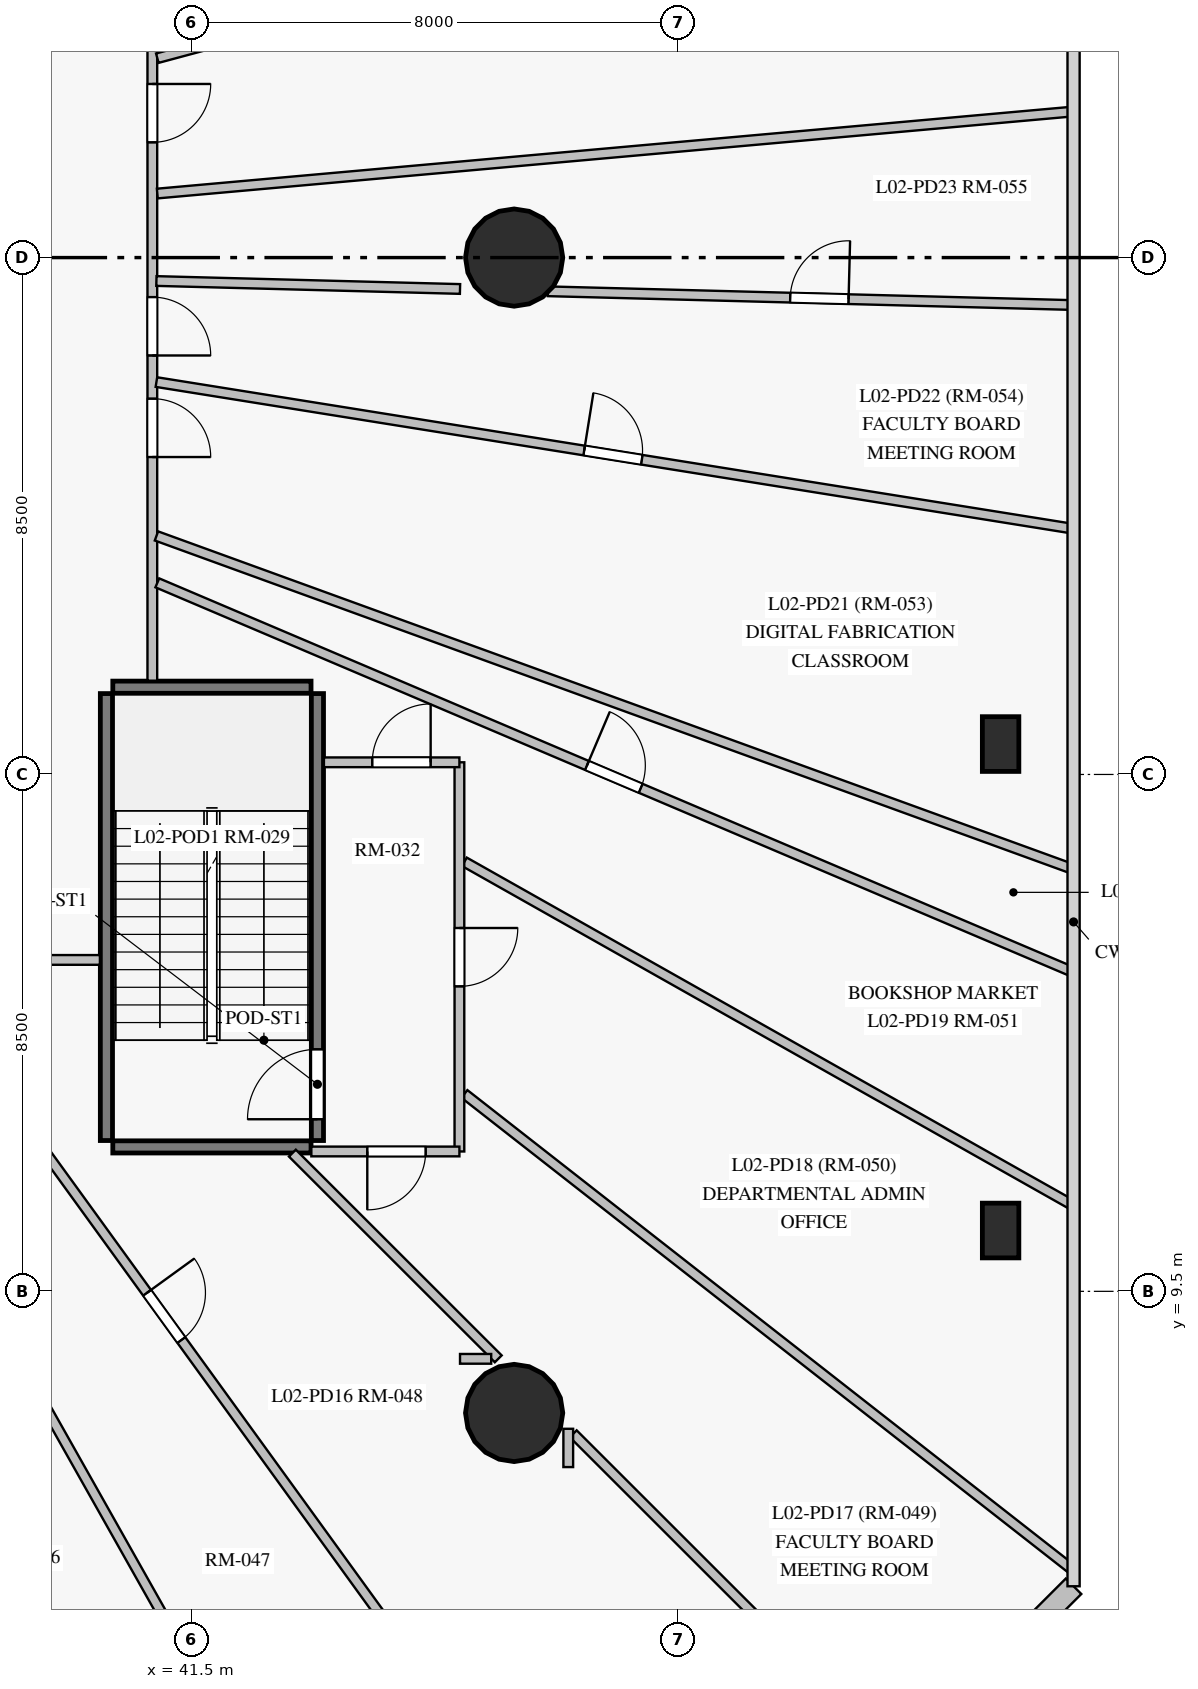
"""IFC4 building model, lengths in metres.
Left out: names, types, materials, properties, quantities, classifications, styles, units other than length and angle.
Written with IfcOpenShell. Run it as: python <this file> out.ifc"""

import sys

from ifc_helpers import new_model, si_unit, direction, frame, frame_2d, origin, origin_with_axes, origin_2d, place, context, subcontext, project, spatial, rectangle, circle, extrude, source, transform, mapped, element, fill, save


model = new_model("IFC4")
c1 = context("Model", 3, precision=1e-05, world=origin(), true_north=direction((0.0, 1.0)))
c2 = subcontext(c1, "Body", "Model", "MODEL_VIEW")
j1 = project(units=[si_unit("LENGTHUNIT", "METRE"), si_unit("PLANEANGLEUNIT", "RADIAN")], contexts=[c1])
p1 = place(None, origin())
s1 = spatial("IfcSite", under=j1, at=p1, CompositionType="ELEMENT")
p2 = place(p1, origin())
s2 = spatial("IfcBuilding", under=s1, at=p2, CompositionType="ELEMENT")
p3 = place(p2, frame((0.0, 0.0, 9.0)))
s3 = spatial("IfcBuildingStorey", under=s2, at=p3, CompositionType="ELEMENT", Elevation=9.0)
m1 = source(origin_with_axes(), c2, "Body", "SweptSolid", [
    extrude(circle(Radius=0.8, at=origin_2d()), origin(), (0.0, 0.0, 1.0), 4.5),
])
for number, where, z_axis, x_axis in (
    (1, (46.8, 7.5, 0.0), (0.0, 0.0, 1.0), (1.0, 0.0, 0.0)),
    (2, (46.8, 26.5, 0.0), (0.0, 0.0, 1.0), (1.0, 0.0, 0.0)),
):
    element("IfcColumn", number, at=place(p3, frame(where, z_axis=z_axis, x_axis=x_axis)), inside=s3, PredefinedType="COLUMN", context=c2, shape_type="MappedRepresentation", body=[
        mapped(m1, transform((0.0, 0.0, 0.0), scale=1.0)),
    ])
m2 = source(origin_with_axes(), c2, "Body", "SweptSolid", [
    extrude(rectangle(XDim=0.6, YDim=0.9, at=origin_2d()), origin(), (0.0, 0.0, 1.0), 4.5),
])
for number, where, z_axis, x_axis in (
    (3, (54.8, 10.5, 0.0), (0.0, 0.0, 1.0), (1.0, 0.0, 0.0)),
    (4, (54.8, 18.5, 0.0), (0.0, 0.0, 1.0), (1.0, 0.0, 0.0)),
):
    element("IfcColumn", number, at=place(p3, frame(where, z_axis=z_axis, x_axis=x_axis)), inside=s3, PredefinedType="PILASTER", context=c2, shape_type="MappedRepresentation", body=[
        mapped(m2, transform((0.0, 0.0, 0.0), scale=1.0)),
    ])
p4 = place(p3, frame((54.6, 3.25, 0.0), z_axis=(0.0, 0.0, 1.0), x_axis=(0.707106781187, 0.707106781187, 0.0)))
e5 = element("IfcWall", 5, at=p4, inside=s3, PredefinedType="SOLIDWALL", context=c2, shape_type="SweptSolid", body=[
    extrude(rectangle(XDim=1.98, YDim=0.36, at=frame_2d((0.99, 0.0))), origin(), (0.0, 0.0, 1.0), 4.2),
])
p5 = place(p3, frame((40.095, 11.98, 0.0), z_axis=(0.0, 0.0, 1.0), x_axis=(0.0, 1.0, 0.0)))
e6 = element("IfcWall", 6, at=p5, inside=s3, PredefinedType="SHEAR", context=c2, shape_type="SweptSolid", body=[
    extrude(rectangle(XDim=7.35, YDim=0.2, at=frame_2d((3.675, 0.0))), origin(), (0.0, 0.0, 1.0), 4.2),
])
p6 = place(p3, frame((43.565, 11.98, 0.0), z_axis=(0.0, 0.0, 1.0), x_axis=(0.0, 1.0, 0.0)))
e7 = element("IfcWall", 7, at=p6, inside=s3, PredefinedType="SHEAR", context=c2, shape_type="SweptSolid", body=[
    extrude(rectangle(XDim=7.35, YDim=0.2, at=frame_2d((3.675, 0.0))), origin(), (0.0, 0.0, 1.0), 4.2),
])
p7 = place(p6, frame((0.35, 0.0, 0.0)))
e8 = element("IfcOpeningElement", 8, at=p7, cuts=e7, PredefinedType="OPENING", context=c2, shape_type="SweptSolid", body=[
    extrude(rectangle(XDim=1.15, YDim=2.15, at=frame_2d((0.575, 1.075))), frame((0.0, 0.11, 0.0), z_axis=(0.0, -1.0, 0.0), x_axis=(1.0, 0.0, 0.0)), (0.0, 0.0, 1.0), 0.22),
])
for number, where, z_axis, x_axis in (
    (9, (40.2, 11.875, 0.0), (0.0, 0.0, 1.0), (1.0, 0.0, 0.0)),
    (10, (40.2, 19.435, 0.0), (0.0, 0.0, 1.0), (1.0, 0.0, 0.0)),
):
    element("IfcWall", number, at=place(p3, frame(where, z_axis=z_axis, x_axis=x_axis)), inside=s3, PredefinedType="SHEAR", context=c2, shape_type="SweptSolid", body=[
        extrude(rectangle(XDim=3.26, YDim=0.2, at=frame_2d((1.63, 0.0))), origin(), (0.0, 0.0, 1.0), 4.2),
    ])
p8 = place(p3, frame((40.85, 38.05, 0.0), z_axis=(0.0, 0.0, 1.0), x_axis=(0.0, -1.0, 0.0)))
e11 = element("IfcWall", 11, at=p8, inside=s3, PredefinedType="PARTITIONING", context=c2, shape_type="SweptSolid", body=[
    extrude(rectangle(XDim=18.508, YDim=0.16, at=frame_2d((9.254, 0.0))), origin(), (0.0, 0.0, 1.0), 3.25),
])
p9 = place(p8, frame((13.87, 0.0, 0.0)))
e12 = element("IfcOpeningElement", 12, at=p9, cuts=e11, PredefinedType="OPENING", context=c2, shape_type="SweptSolid", body=[
    extrude(rectangle(XDim=0.96, YDim=2.15, at=frame_2d((0.48, 1.075))), frame((0.0, 0.09, 0.0), z_axis=(0.0, -1.0, 0.0), x_axis=(1.0, 0.0, 0.0)), (0.0, 0.0, 1.0), 0.18),
])
p10 = place(p8, frame((8.695, 0.0, 0.0)))
e13 = element("IfcOpeningElement", 13, at=p10, cuts=e11, PredefinedType="OPENING", context=c2, shape_type="SweptSolid", body=[
    extrude(rectangle(XDim=0.96, YDim=2.15, at=frame_2d((0.48, 1.075))), frame((0.0, 0.09, 0.0), z_axis=(0.0, -1.0, 0.0), x_axis=(1.0, 0.0, 0.0)), (0.0, 0.0, 1.0), 0.18),
])
p11 = place(p8, frame((6.334, 0.0, 0.0)))
e14 = element("IfcOpeningElement", 14, at=p11, cuts=e11, PredefinedType="OPENING", context=c2, shape_type="SweptSolid", body=[
    extrude(rectangle(XDim=0.96, YDim=2.15, at=frame_2d((0.48, 1.075))), frame((0.0, 0.09, 0.0), z_axis=(0.0, -1.0, 0.0), x_axis=(1.0, 0.0, 0.0)), (0.0, 0.0, 1.0), 0.18),
])
p12 = place(p8, frame((12.2, 0.0, 0.0)))
e15 = element("IfcOpeningElement", 15, at=p12, cuts=e11, PredefinedType="OPENING", context=c2, shape_type="SweptSolid", body=[
    extrude(rectangle(XDim=0.96, YDim=2.15, at=frame_2d((0.48, 1.075))), frame((0.0, 0.09, 0.0), z_axis=(0.0, -1.0, 0.0), x_axis=(1.0, 0.0, 0.0)), (0.0, 0.0, 1.0), 0.18),
])
p13 = place(p8, frame((2.76, 0.0, 0.0)))
e16 = element("IfcOpeningElement", 16, at=p13, cuts=e11, PredefinedType="OPENING", context=c2, shape_type="SweptSolid", body=[
    extrude(rectangle(XDim=0.86, YDim=2.04, at=frame_2d((0.43, 1.02))), frame((0.0, 0.09, 0.0), z_axis=(0.0, -1.0, 0.0), x_axis=(1.0, 0.0, 0.0)), (0.0, 0.0, 1.0), 0.18),
])
p14 = place(p8, frame((1.494, 0.0, 0.0)))
e17 = element("IfcOpeningElement", 17, at=p14, cuts=e11, PredefinedType="OPENING", context=c2, shape_type="SweptSolid", body=[
    extrude(rectangle(XDim=0.86, YDim=2.04, at=frame_2d((0.43, 1.02))), frame((0.0, 0.09, 0.0), z_axis=(0.0, -1.0, 0.0), x_axis=(1.0, 0.0, 0.0)), (0.0, 0.0, 1.0), 0.18),
])
p15 = place(p3, frame((40.932, 21.151, 0.0), z_axis=(0.0, 0.0, 1.0), x_axis=(0.920324867376, -0.39115487788, 0.0)))
e18 = element("IfcWall", 18, at=p15, inside=s3, PredefinedType="PARTITIONING", context=c2, shape_type="SweptSolid", body=[
    extrude(rectangle(XDim=16.34, YDim=0.16, at=frame_2d((8.17, 0.0))), origin(), (0.0, 0.0, 1.0), 4.2),
])
p16 = place(p15, frame((7.677, 0.0, 0.0)))
e19 = element("IfcOpeningElement", 19, at=p16, cuts=e18, PredefinedType="OPENING", context=c2, shape_type="SweptSolid", body=[
    extrude(rectangle(XDim=0.96, YDim=2.15, at=frame_2d((0.48, 1.075))), frame((0.0, 0.09, 0.0), z_axis=(0.0, -1.0, 0.0), x_axis=(1.0, 0.0, 0.0)), (0.0, 0.0, 1.0), 0.18),
])
p17 = place(p3, frame((40.918, 21.922, 0.0), z_axis=(0.0, 0.0, 1.0), x_axis=(0.93983791992, -0.341620673088, 0.0)))
e20 = element("IfcWall", 20, at=p17, inside=s3, PredefinedType="PARTITIONING", context=c2, shape_type="SweptSolid", body=[
    extrude(rectangle(XDim=16.017, YDim=0.16, at=frame_2d((8.008, 0.0))), origin(), (0.0, 0.0, 1.0), 4.2),
])
p18 = place(p3, frame((40.932, 29.779, 0.0), z_axis=(0.0, 0.0, 1.0), x_axis=(0.96572887565, 0.259552959405, 0.0)))
e21 = element("IfcWall", 21, at=p18, inside=s3, PredefinedType="PARTITIONING", context=c2, shape_type="SweptSolid", body=[
    extrude(rectangle(XDim=15.575, YDim=0.16, at=frame_2d((7.787, 0.0))), origin(), (0.0, 0.0, 1.0), 3.7),
])
p19 = place(p3, frame((40.917, 24.453, 0.0), z_axis=(0.0, 0.0, 1.0), x_axis=(0.987442330367, -0.157979885424, 0.0)))
e22 = element("IfcWall", 22, at=p19, inside=s3, PredefinedType="PARTITIONING", context=c2, shape_type="SweptSolid", body=[
    extrude(rectangle(XDim=15.248, YDim=0.16, at=frame_2d((7.624, 0.0))), origin(), (0.0, 0.0, 1.0), 3.7),
])
p20 = place(p19, frame((7.124, 0.0, 0.0)))
e23 = element("IfcOpeningElement", 23, at=p20, cuts=e22, PredefinedType="OPENING", context=c2, shape_type="SweptSolid", body=[
    extrude(rectangle(XDim=0.96, YDim=2.15, at=frame_2d((0.48, 1.075))), frame((0.0, 0.09, 0.0), z_axis=(0.0, -1.0, 0.0), x_axis=(1.0, 0.0, 0.0)), (0.0, 0.0, 1.0), 0.18),
])
p21 = place(p3, frame((40.932, 27.553, 0.0), z_axis=(0.0, 0.0, 1.0), x_axis=(0.996013941628, 0.08919769102, 0.0)))
e24 = element("IfcWall", 24, at=p21, inside=s3, PredefinedType="PARTITIONING", context=c2, shape_type="SweptSolid", body=[
    extrude(rectangle(XDim=15.103, YDim=0.16, at=frame_2d((7.552, 0.0))), origin(), (0.0, 0.0, 1.0), 3.7),
])
p22 = place(p3, frame((39.988, 14.95, 0.0), z_axis=(0.0, 0.0, 1.0), x_axis=(-1.0, 0.0, 0.0)))
e25 = element("IfcWall", 25, at=p22, inside=s3, PredefinedType="PARTITIONING", context=c2, shape_type="SweptSolid", body=[
    extrude(rectangle(XDim=14.588, YDim=0.16, at=frame_2d((7.294, 0.0))), origin(), (0.0, 0.0, 1.0), 4.2),
])
p23 = place(p22, frame((10.34, 0.0, 0.0)))
e26 = element("IfcOpeningElement", 26, at=p23, cuts=e25, PredefinedType="OPENING", context=c2, shape_type="SweptSolid", body=[
    extrude(rectangle(XDim=0.96, YDim=2.15, at=frame_2d((0.48, 1.075))), frame((0.0, 0.09, 0.0), z_axis=(0.0, -1.0, 0.0), x_axis=(1.0, 0.0, 0.0)), (0.0, 0.0, 1.0), 0.18),
])
p24 = place(p22, frame((7.608, 0.0, 0.0)))
e27 = element("IfcOpeningElement", 27, at=p24, cuts=e25, PredefinedType="OPENING", context=c2, shape_type="SweptSolid", body=[
    extrude(rectangle(XDim=0.96, YDim=2.15, at=frame_2d((0.48, 1.075))), frame((0.0, 0.09, 0.0), z_axis=(0.0, -1.0, 0.0), x_axis=(1.0, 0.0, 0.0)), (0.0, 0.0, 1.0), 0.18),
])
p25 = place(p22, frame((5.545, 0.0, 0.0)))
e28 = element("IfcOpeningElement", 28, at=p25, cuts=e25, PredefinedType="OPENING", context=c2, shape_type="SweptSolid", body=[
    extrude(rectangle(XDim=0.96, YDim=2.15, at=frame_2d((0.48, 1.075))), frame((0.0, 0.09, 0.0), z_axis=(0.0, -1.0, 0.0), x_axis=(1.0, 0.0, 0.0)), (0.0, 0.0, 1.0), 0.18),
])
p26 = place(p22, frame((3.582, 0.0, 0.0)))
e29 = element("IfcOpeningElement", 29, at=p26, cuts=e25, PredefinedType="OPENING", context=c2, shape_type="SweptSolid", body=[
    extrude(rectangle(XDim=0.96, YDim=2.15, at=frame_2d((0.48, 1.075))), frame((0.0, 0.09, 0.0), z_axis=(0.0, -1.0, 0.0), x_axis=(1.0, 0.0, 0.0)), (0.0, 0.0, 1.0), 0.18),
])
p27 = place(p22, frame((1.54, 0.0, 0.0)))
e30 = element("IfcOpeningElement", 30, at=p27, cuts=e25, PredefinedType="OPENING", context=c2, shape_type="SweptSolid", body=[
    extrude(rectangle(XDim=0.96, YDim=2.15, at=frame_2d((0.48, 1.075))), frame((0.0, 0.09, 0.0), z_axis=(0.0, -1.0, 0.0), x_axis=(1.0, 0.0, 0.0)), (0.0, 0.0, 1.0), 0.18),
])
p28 = place(p3, frame((36.856, 14.868, 0.0), z_axis=(0.0, 0.0, 1.0), x_axis=(0.586848404005, -0.809696826422, 0.0)))
e31 = element("IfcWall", 31, at=p28, inside=s3, PredefinedType="PARTITIONING", context=c2, shape_type="SweptSolid", body=[
    extrude(rectangle(XDim=14.302, YDim=0.16, at=frame_2d((7.151, 0.0))), origin(), (0.0, 0.0, 1.0), 4.2),
])
p29 = place(p28, frame((6.659, 0.0, 0.0)))
e32 = element("IfcOpeningElement", 32, at=p29, cuts=e31, PredefinedType="OPENING", context=c2, shape_type="SweptSolid", body=[
    extrude(rectangle(XDim=0.96, YDim=2.15, at=frame_2d((0.48, 1.075))), frame((0.0, 0.09, 0.0), z_axis=(0.0, -1.0, 0.0), x_axis=(1.0, 0.0, 0.0)), (0.0, 0.0, 1.0), 0.18),
])
p30 = place(p3, frame((34.991, 14.868, 0.0), z_axis=(0.0, 0.0, 1.0), x_axis=(0.491242274215, -0.871022977897, 0.0)))
e33 = element("IfcWall", 33, at=p30, inside=s3, PredefinedType="PARTITIONING", context=c2, shape_type="SweptSolid", body=[
    extrude(rectangle(XDim=13.3, YDim=0.16, at=frame_2d((6.65, 0.0))), origin(), (0.0, 0.0, 1.0), 4.2),
])
p31 = place(p3, frame((45.982, 12.746, 0.0), z_axis=(0.0, 0.0, 1.0), x_axis=(0.787599730353, -0.616187199436, 0.0)))
e34 = element("IfcWall", 34, at=p31, inside=s3, PredefinedType="PARTITIONING", context=c2, shape_type="SweptSolid", body=[
    extrude(rectangle(XDim=12.67, YDim=0.16, at=frame_2d((6.335, 0.0))), origin(), (0.0, 0.0, 1.0), 4.2),
])
p32 = place(p3, frame((45.982, 16.563, 0.0), z_axis=(0.0, 0.0, 1.0), x_axis=(0.870851801876, -0.491545663362, 0.0)))
e35 = element("IfcWall", 35, at=p32, inside=s3, PredefinedType="PARTITIONING", context=c2, shape_type="SweptSolid", body=[
    extrude(rectangle(XDim=11.465, YDim=0.16, at=frame_2d((5.733, 0.0))), origin(), (0.0, 0.0, 1.0), 4.2),
])
p33 = place(p3, frame((47.356, 25.946, 0.0), z_axis=(0.0, 0.0, 1.0), x_axis=(0.999656949927, -0.026191266922, 0.0)))
e36 = element("IfcWall", 36, at=p33, inside=s3, PredefinedType="PARTITIONING", context=c2, shape_type="SweptSolid", body=[
    extrude(rectangle(XDim=8.622, YDim=0.16, at=frame_2d((4.311, 0.0))), origin(), (0.0, 0.0, 1.0), 3.7),
])
p34 = place(p33, frame((3.986, 0.0, 0.0)))
e37 = element("IfcOpeningElement", 37, at=p34, cuts=e36, PredefinedType="OPENING", context=c2, shape_type="SweptSolid", body=[
    extrude(rectangle(XDim=0.96, YDim=2.15, at=frame_2d((0.48, 1.075))), frame((0.0, 0.09, 0.0), z_axis=(0.0, -1.0, 0.0), x_axis=(1.0, 0.0, 0.0)), (0.0, 0.0, 1.0), 0.18),
])
p35 = place(p3, frame((45.9, 18.2, 0.0), z_axis=(0.0, 0.0, 1.0), x_axis=(0.0, -1.0, 0.0)))
e38 = element("IfcWall", 38, at=p35, inside=s3, PredefinedType="PARTITIONING", context=c2, shape_type="SweptSolid", body=[
    extrude(rectangle(XDim=6.4, YDim=0.16, at=frame_2d((3.2, 0.0))), origin(), (0.0, 0.0, 1.0), 4.2),
])
p36 = place(p35, frame((2.725, 0.0, 0.0)))
e39 = element("IfcOpeningElement", 39, at=p36, cuts=e38, PredefinedType="OPENING", context=c2, shape_type="SweptSolid", body=[
    extrude(rectangle(XDim=0.96, YDim=2.15, at=frame_2d((0.48, 1.075))), frame((0.0, 0.09, 0.0), z_axis=(0.0, -1.0, 0.0), x_axis=(1.0, 0.0, 0.0)), (0.0, 0.0, 1.0), 0.18),
])
p37 = place(p3, frame((47.772, 7.158, 0.0), z_axis=(0.0, 0.0, 1.0), x_axis=(0.707397041121, -0.706816402055, 0.0)))
e40 = element("IfcWall", 40, at=p37, inside=s3, PredefinedType="PARTITIONING", context=c2, shape_type="SweptSolid", body=[
    extrude(rectangle(XDim=5.466, YDim=0.16, at=frame_2d((2.733, 0.0))), origin(), (0.0, 0.0, 1.0), 4.2),
])
p38 = place(p3, frame((40.917, 26.115, 0.0), z_axis=(0.0, 0.0, 1.0), x_axis=(0.999656721333, -0.026199990349, 0.0)))
e41 = element("IfcWall", 41, at=p38, inside=s3, PredefinedType="PARTITIONING", context=c2, shape_type="SweptSolid", body=[
    extrude(rectangle(XDim=4.995, YDim=0.16, at=frame_2d((2.497, 0.0))), origin(), (0.0, 0.0, 1.0), 3.25),
])
p39 = place(p3, frame((43.153, 11.773, 0.0), z_axis=(0.0, 0.0, 1.0), x_axis=(0.707361787394, -0.706851682982, 0.0)))
e42 = element("IfcWall", 42, at=p39, inside=s3, PredefinedType="PARTITIONING", context=c2, shape_type="SweptSolid", body=[
    extrude(rectangle(XDim=4.786, YDim=0.16, at=frame_2d((2.393, 0.0))), origin(), (0.0, 0.0, 1.0), 3.25),
])
p40 = place(p3, frame((45.9, 11.8, 0.0), z_axis=(0.0, 0.0, 1.0), x_axis=(-1.0, 0.0, 0.0)))
e43 = element("IfcWall", 43, at=p40, inside=s3, PredefinedType="PARTITIONING", context=c2, shape_type="SweptSolid", body=[
    extrude(rectangle(XDim=2.435, YDim=0.16, at=frame_2d((1.217, 0.0))), origin(), (0.0, 0.0, 1.0), 4.2),
])
p41 = place(p40, frame((0.555, 0.0, 0.0)))
e44 = element("IfcOpeningElement", 44, at=p41, cuts=e43, PredefinedType="OPENING", context=c2, shape_type="SweptSolid", body=[
    extrude(rectangle(XDim=0.96, YDim=2.15, at=frame_2d((0.48, 1.075))), frame((0.0, 0.09, 0.0), z_axis=(0.0, -1.0, 0.0), x_axis=(1.0, 0.0, 0.0)), (0.0, 0.0, 1.0), 0.18),
])
p42 = place(p3, frame((43.672, 18.2, 0.0), z_axis=(0.0, 0.0, 1.0), x_axis=(1.0, 0.0, 0.0)))
e45 = element("IfcWall", 45, at=p42, inside=s3, PredefinedType="PARTITIONING", context=c2, shape_type="SweptSolid", body=[
    extrude(rectangle(XDim=2.228, YDim=0.16, at=frame_2d((1.114, 0.0))), origin(), (0.0, 0.0, 1.0), 4.2),
])
p43 = place(p42, frame((0.795, 0.0, 0.0)))
e46 = element("IfcOpeningElement", 46, at=p43, cuts=e45, PredefinedType="OPENING", context=c2, shape_type="SweptSolid", body=[
    extrude(rectangle(XDim=0.96, YDim=2.15, at=frame_2d((0.48, 1.075))), frame((0.0, 0.09, 0.0), z_axis=(0.0, -1.0, 0.0), x_axis=(1.0, 0.0, 0.0)), (0.0, 0.0, 1.0), 0.18),
])
p44 = place(p3, frame((47.69, 6.61, 0.0), z_axis=(0.0, 0.0, 1.0), x_axis=(0.0, 1.0, 0.0)))
e47 = element("IfcWall", 47, at=p44, inside=s3, PredefinedType="PARTITIONING", context=c2, shape_type="SweptSolid", body=[
    extrude(rectangle(XDim=0.629, YDim=0.16, at=frame_2d((0.315, 0.0))), origin(), (0.0, 0.0, 1.0), 4.2),
])
p45 = place(p3, frame((46.423, 8.39, 0.0), z_axis=(0.0, 0.0, 1.0), x_axis=(-1.0, 0.0, 0.0)))
e48 = element("IfcWall", 48, at=p45, inside=s3, PredefinedType="PARTITIONING", context=c2, shape_type="SweptSolid", body=[
    extrude(rectangle(XDim=0.513, YDim=0.16, at=frame_2d((0.256, 0.0))), origin(), (0.0, 0.0, 1.0), 4.2),
])
m3 = source(origin_with_axes(), c2, "Body", "SweptSolid", [
    extrude(rectangle(XDim=1.15, YDim=2.15, at=frame_2d((0.575, 1.075))), frame((0.0, 0.025, 0.0), z_axis=(0.0, -1.0, 0.0), x_axis=(1.0, 0.0, 0.0)), (0.0, 0.0, 1.0), 0.05),
])
p46 = place(p7, origin())
e49 = element("IfcDoor", 49, at=p46, inside=s3, OperationType="SINGLE_SWING_LEFT", PredefinedType="DOOR", context=c2, shape_type="MappedRepresentation", body=[
    mapped(m3, transform((0.0, 0.0, 0.0), scale=1.0)),
])
fill(e8, e49)
m4 = source(origin_with_axes(), c2, "Body", "SweptSolid", [
    extrude(rectangle(XDim=0.96, YDim=2.15, at=frame_2d((0.48, 1.075))), frame((0.0, 0.025, 0.0), z_axis=(0.0, -1.0, 0.0), x_axis=(1.0, 0.0, 0.0)), (0.0, 0.0, 1.0), 0.05),
])
p47 = place(p29, origin())
e50 = element("IfcDoor", 50, at=p47, inside=s3, OperationType="SINGLE_SWING_LEFT", PredefinedType="DOOR", context=c2, shape_type="MappedRepresentation", body=[
    mapped(m4, transform((0.0, 0.0, 0.0), scale=1.0)),
])
fill(e32, e50)
p48 = place(p41, origin())
e51 = element("IfcDoor", 51, at=p48, inside=s3, OperationType="SINGLE_SWING_RIGHT", PredefinedType="DOOR", context=c2, shape_type="MappedRepresentation", body=[
    mapped(m4, transform((0.0, 0.0, 0.0), scale=1.0)),
])
fill(e44, e51)
p49 = place(p36, origin())
e52 = element("IfcDoor", 52, at=p49, inside=s3, OperationType="SINGLE_SWING_LEFT", PredefinedType="DOOR", context=c2, shape_type="MappedRepresentation", body=[
    mapped(m4, transform((0.0, 0.0, 0.0), scale=1.0)),
])
fill(e39, e52)
p50 = place(p43, origin())
e53 = element("IfcDoor", 53, at=p50, inside=s3, OperationType="SINGLE_SWING_RIGHT", PredefinedType="DOOR", context=c2, shape_type="MappedRepresentation", body=[
    mapped(m4, transform((0.0, 0.0, 0.0), scale=1.0)),
])
fill(e46, e53)
p51 = place(p16, origin())
e54 = element("IfcDoor", 54, at=p51, inside=s3, OperationType="SINGLE_SWING_LEFT", PredefinedType="DOOR", context=c2, shape_type="MappedRepresentation", body=[
    mapped(m4, transform((0.0, 0.0, 0.0), scale=1.0)),
])
fill(e19, e54)
p52 = place(p9, origin())
e55 = element("IfcDoor", 55, at=p52, inside=s3, OperationType="SINGLE_SWING_RIGHT", PredefinedType="DOOR", context=c2, shape_type="MappedRepresentation", body=[
    mapped(m4, transform((0.0, 0.0, 0.0), scale=1.0)),
])
fill(e12, e55)
p53 = place(p20, origin())
e56 = element("IfcDoor", 56, at=p53, inside=s3, OperationType="SINGLE_SWING_LEFT", PredefinedType="DOOR", context=c2, shape_type="MappedRepresentation", body=[
    mapped(m4, transform((0.0, 0.0, 0.0), scale=1.0)),
])
fill(e23, e56)
p54 = place(p34, origin())
e57 = element("IfcDoor", 57, at=p54, inside=s3, OperationType="SINGLE_SWING_RIGHT", PredefinedType="DOOR", context=c2, shape_type="MappedRepresentation", body=[
    mapped(m4, transform((0.0, 0.0, 0.0), scale=1.0)),
])
fill(e37, e57)
p55 = place(p10, origin())
e58 = element("IfcDoor", 58, at=p55, inside=s3, OperationType="SINGLE_SWING_LEFT", PredefinedType="DOOR", context=c2, shape_type="MappedRepresentation", body=[
    mapped(m4, transform((0.0, 0.0, 0.0), scale=1.0)),
])
fill(e13, e58)
p56 = place(p12, origin())
e59 = element("IfcDoor", 59, at=p56, inside=s3, OperationType="SINGLE_SWING_RIGHT", PredefinedType="DOOR", context=c2, shape_type="MappedRepresentation", body=[
    mapped(m4, transform((0.0, 0.0, 0.0), scale=1.0)),
])
fill(e15, e59)
save(model, sys.argv[1])
